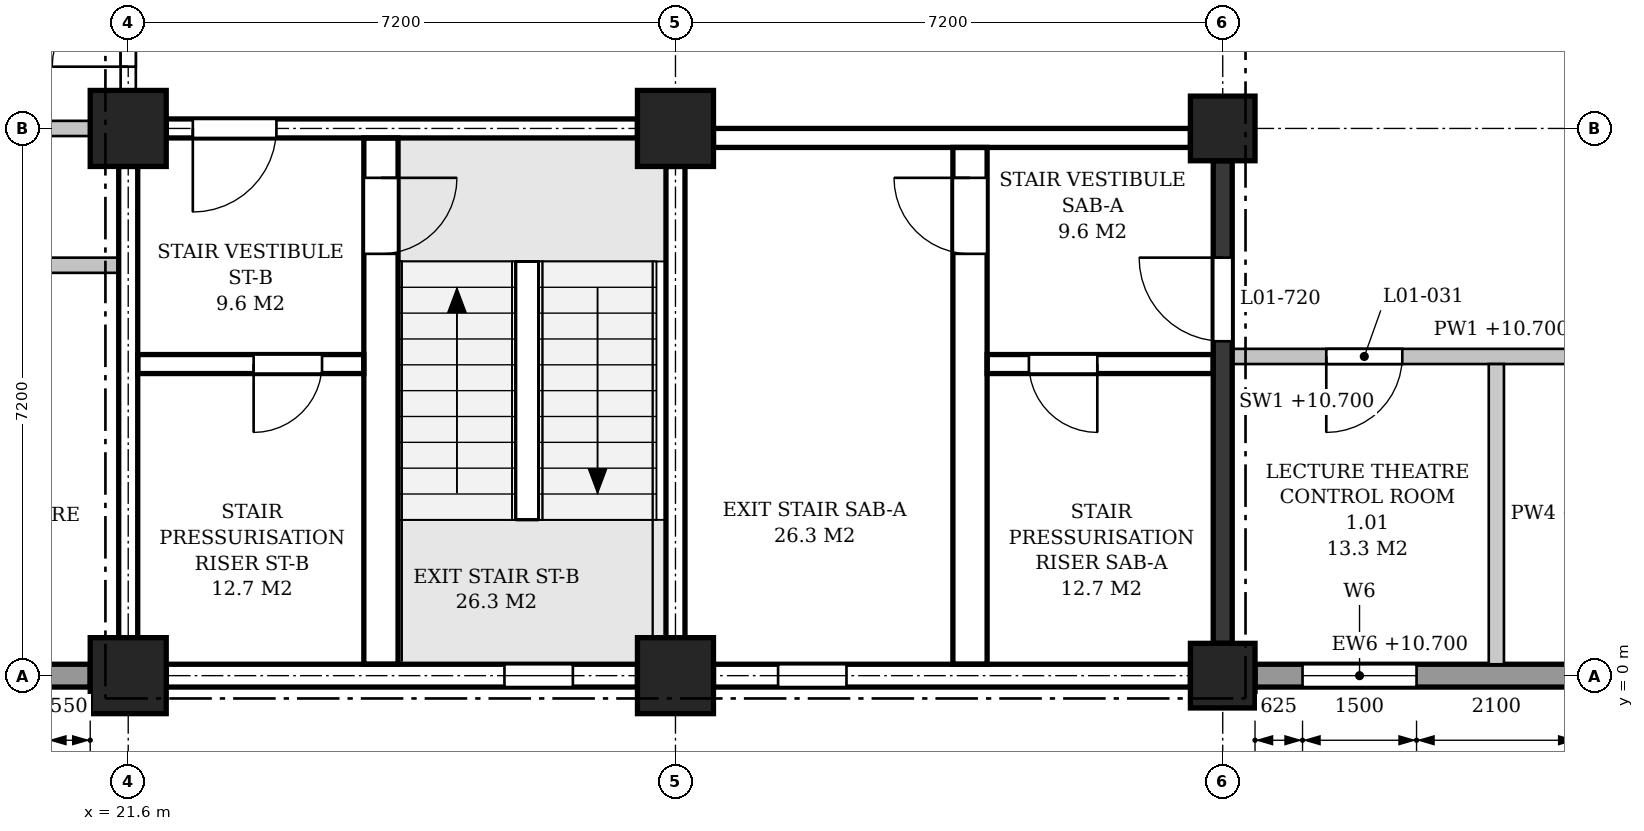
"""IFC4 building model, lengths in metres.
Left out: names, types, materials, properties, quantities, classifications, styles, units other than length and angle.
Written with IfcOpenShell. Run it as: python <this file> out.ifc"""

import sys

from ifc_helpers import new_model, si_unit, direction, frame, frame_2d, origin, origin_2d, place, context, subcontext, project, spatial, polyline, rectangle, outline, extrude, element, fill, save


model = new_model("IFC4")
c1 = context("Model", 3, precision=1e-05, world=origin(), true_north=direction((0.0, 1.0)))
c2 = subcontext(c1, "Body", "Model", "MODEL_VIEW")
j1 = project(units=[si_unit("LENGTHUNIT", "METRE"), si_unit("PLANEANGLEUNIT", "RADIAN")], contexts=[c1])
p1 = place(None, origin())
s1 = spatial("IfcSite", under=j1, at=p1, CompositionType="ELEMENT")
p2 = place(p1, origin())
s2 = spatial("IfcBuilding", under=s1, at=p2, CompositionType="ELEMENT")
p3 = place(p2, frame((0.0, 0.0, 6.0)))
s3 = spatial("IfcBuildingStorey", under=s2, at=p3, CompositionType="ELEMENT", Elevation=6.0)
for number, where, z_axis, x_axis in (
    (1, (21.6, 0.0, 0.0), (0.0, 0.0, 1.0), (1.0, 0.0, 0.0)),
    (2, (21.6, 7.2, 0.0), (0.0, 0.0, 1.0), (1.0, 0.0, 0.0)),
    (3, (28.8, 0.0, 0.0), (0.0, 0.0, 1.0), (1.0, 0.0, 0.0)),
    (4, (28.8, 7.2, 0.0), (0.0, 0.0, 1.0), (1.0, 0.0, 0.0)),
):
    element("IfcColumn", number, at=place(p3, frame(where, z_axis=z_axis, x_axis=x_axis)), inside=s3, PredefinedType="COLUMN", context=c2, shape_type="SweptSolid", body=[
        extrude(rectangle(XDim=1.0, YDim=1.0, at=origin_2d()), origin(), (0.0, 0.0, 1.0), 5.4),
    ])
for number, where, z_axis, x_axis in (
    (5, (36.0, 0.0, 0.0), (0.0, 0.0, 1.0), (1.0, 0.0, 0.0)),
    (6, (36.0, 7.2, 0.0), (0.0, 0.0, 1.0), (1.0, 0.0, 0.0)),
):
    element("IfcColumn", number, at=place(p3, frame(where, z_axis=z_axis, x_axis=x_axis)), inside=s3, PredefinedType="COLUMN", context=c2, shape_type="SweptSolid", body=[
        extrude(rectangle(XDim=0.85, YDim=0.85, at=origin_2d()), origin(), (0.0, 0.0, 1.0), 5.4),
    ])
p4 = place(p3, frame((14.9, 0.0, 0.0), z_axis=(0.0, 0.0, 1.0), x_axis=(1.0, 0.0, 0.0)))
e7 = element("IfcWall", 7, at=p4, inside=s3, PredefinedType="STANDARD", context=c2, shape_type="SweptSolid", body=[
    extrude(rectangle(XDim=6.2, YDim=0.3, at=frame_2d((3.1, 0.0))), origin(), (0.0, 0.0, 1.0), 4.55),
])
p5 = place(p4, frame((0.55, 0.0, 0.9)))
e8 = element("IfcOpeningElement", 8, at=p5, cuts=e7, PredefinedType="OPENING", context=c2, shape_type="SweptSolid", body=[
    extrude(outline(polyline([(0.0, 0.0), (1.5, 0.0), (1.5, 2.85), (0.75, 3.6), (0.0, 2.85), (0.0, 0.0)])), frame((0.0, 0.16, 0.0), z_axis=(0.0, -1.0, 0.0), x_axis=(1.0, 0.0, 0.0)), (0.0, 0.0, 1.0), 0.32),
])
p6 = place(p4, frame((4.15, 0.0, 0.9)))
e9 = element("IfcOpeningElement", 9, at=p6, cuts=e7, PredefinedType="OPENING", context=c2, shape_type="SweptSolid", body=[
    extrude(outline(polyline([(0.0, 0.0), (1.5, 0.0), (1.5, 2.85), (0.75, 3.6), (0.0, 2.85), (0.0, 0.0)])), frame((0.0, 0.16, 0.0), z_axis=(0.0, -1.0, 0.0), x_axis=(1.0, 0.0, 0.0)), (0.0, 0.0, 1.0), 0.32),
])
p7 = place(p3, frame((22.1, 0.0, 0.0), z_axis=(0.0, 0.0, 1.0), x_axis=(1.0, 0.0, 0.0)))
e10 = element("IfcWall", 10, at=p7, inside=s3, PredefinedType="STANDARD", context=c2, shape_type="SweptSolid", body=[
    extrude(rectangle(XDim=6.2, YDim=0.3, at=frame_2d((3.1, 0.0))), origin(), (0.0, 0.0, 1.0), 4.55),
])
p8 = place(p7, frame((4.45, 0.0, 0.9)))
e11 = element("IfcOpeningElement", 11, at=p8, cuts=e10, PredefinedType="OPENING", context=c2, shape_type="SweptSolid", body=[
    extrude(outline(polyline([(0.0, 0.0), (0.9, 0.0), (0.9, 3.15), (0.45, 3.6), (0.0, 3.15), (0.0, 0.0)])), frame((0.0, 0.16, 0.0), z_axis=(0.0, -1.0, 0.0), x_axis=(1.0, 0.0, 0.0)), (0.0, 0.0, 1.0), 0.32),
])
p9 = place(p3, frame((29.3, 0.0, 0.0), z_axis=(0.0, 0.0, 1.0), x_axis=(1.0, 0.0, 0.0)))
e12 = element("IfcWall", 12, at=p9, inside=s3, PredefinedType="STANDARD", context=c2, shape_type="SweptSolid", body=[
    extrude(rectangle(XDim=6.275, YDim=0.3, at=frame_2d((3.137, 0.0))), origin(), (0.0, 0.0, 1.0), 4.7),
])
p10 = place(p9, frame((0.85, 0.0, 0.9)))
e13 = element("IfcOpeningElement", 13, at=p10, cuts=e12, PredefinedType="OPENING", context=c2, shape_type="SweptSolid", body=[
    extrude(outline(polyline([(0.0, 0.0), (0.9, 0.0), (0.9, 3.15), (0.45, 3.6), (0.0, 3.15), (0.0, 0.0)])), frame((0.0, 0.16, 0.0), z_axis=(0.0, -1.0, 0.0), x_axis=(1.0, 0.0, 0.0)), (0.0, 0.0, 1.0), 0.32),
])
p11 = place(p3, frame((36.425, 0.0, 0.0), z_axis=(0.0, 0.0, 1.0), x_axis=(1.0, 0.0, 0.0)))
e14 = element("IfcWall", 14, at=p11, inside=s3, PredefinedType="STANDARD", context=c2, shape_type="SweptSolid", body=[
    extrude(rectangle(XDim=6.35, YDim=0.3, at=frame_2d((3.175, 0.0))), origin(), (0.0, 0.0, 1.0), 4.7),
])
p12 = place(p11, frame((0.625, 0.0, 0.9)))
e15 = element("IfcOpeningElement", 15, at=p12, cuts=e14, PredefinedType="OPENING", context=c2, shape_type="SweptSolid", body=[
    extrude(outline(polyline([(0.0, 0.0), (1.5, 0.0), (1.5, 2.85), (0.75, 3.6), (0.0, 2.85), (0.0, 0.0)])), frame((0.0, 0.16, 0.0), z_axis=(0.0, -1.0, 0.0), x_axis=(1.0, 0.0, 0.0)), (0.0, 0.0, 1.0), 0.32),
])
p13 = place(p11, frame((4.225, 0.0, 0.9)))
e16 = element("IfcOpeningElement", 16, at=p13, cuts=e14, PredefinedType="OPENING", context=c2, shape_type="SweptSolid", body=[
    extrude(outline(polyline([(0.0, 0.0), (1.5, 0.0), (1.5, 2.85), (0.75, 3.6), (0.0, 2.85), (0.0, 0.0)])), frame((0.0, 0.16, 0.0), z_axis=(0.0, -1.0, 0.0), x_axis=(1.0, 0.0, 0.0)), (0.0, 0.0, 1.0), 0.32),
])
p14 = place(p3, frame((29.3, 7.075, 0.0), z_axis=(0.0, 0.0, 1.0), x_axis=(1.0, 0.0, 0.0)))
e17 = element("IfcWall", 17, at=p14, inside=s3, PredefinedType="SHEAR", context=c2, shape_type="SweptSolid", body=[
    extrude(rectangle(XDim=6.275, YDim=0.25, at=frame_2d((3.137, 0.0))), origin(), (0.0, 0.0, 1.0), 4.7),
])
p15 = place(p3, frame((28.8, 0.5, -0.25), z_axis=(0.0, 0.0, 1.0), x_axis=(0.0, 1.0, 0.0)))
e18 = element("IfcWall", 18, at=p15, inside=s3, PredefinedType="SHEAR", context=c2, shape_type="SweptSolid", body=[
    extrude(rectangle(XDim=6.2, YDim=0.25, at=frame_2d((3.1, 0.0))), origin(), (0.0, 0.0, 1.0), 4.8),
])
p16 = place(p3, frame((36.0, 0.425, 0.0), z_axis=(0.0, 0.0, 1.0), x_axis=(0.0, 1.0, 0.0)))
e19 = element("IfcWall", 19, at=p16, inside=s3, PredefinedType="SHEAR", context=c2, shape_type="SweptSolid", body=[
    extrude(rectangle(XDim=6.35, YDim=0.25, at=frame_2d((3.175, 0.0))), origin(), (0.0, 0.0, 1.0), 4.7),
])
p17 = place(p16, frame((3.975, 0.0, 0.0)))
e20 = element("IfcOpeningElement", 20, at=p17, cuts=e19, PredefinedType="OPENING", context=c2, shape_type="SweptSolid", body=[
    extrude(rectangle(XDim=1.1, YDim=2.1, at=frame_2d((0.55, 1.05))), frame((0.0, 0.135, 0.0), z_axis=(0.0, -1.0, 0.0), x_axis=(1.0, 0.0, 0.0)), (0.0, 0.0, 1.0), 0.27),
])
p18 = place(p3, frame((32.675, 0.15, 0.0), z_axis=(0.0, 0.0, 1.0), x_axis=(0.0, 1.0, 0.0)))
e21 = element("IfcWall", 21, at=p18, inside=s3, PredefinedType="SHEAR", context=c2, shape_type="SweptSolid", body=[
    extrude(rectangle(XDim=6.8, YDim=0.45, at=frame_2d((3.4, 0.0))), origin(), (0.0, 0.0, 1.0), 4.7),
])
p19 = place(p18, frame((5.4, 0.0, 0.0)))
e22 = element("IfcOpeningElement", 22, at=p19, cuts=e21, PredefinedType="OPENING", context=c2, shape_type="SweptSolid", body=[
    extrude(rectangle(XDim=1.0, YDim=2.1, at=frame_2d((0.5, 1.05))), frame((0.0, 0.235, 0.0), z_axis=(0.0, -1.0, 0.0), x_axis=(1.0, 0.0, 0.0)), (0.0, 0.0, 1.0), 0.47),
])
p20 = place(p3, frame((32.9, 4.1, 0.0), z_axis=(0.0, 0.0, 1.0), x_axis=(1.0, 0.0, 0.0)))
e23 = element("IfcWall", 23, at=p20, inside=s3, PredefinedType="SHEAR", context=c2, shape_type="SweptSolid", body=[
    extrude(rectangle(XDim=2.975, YDim=0.25, at=frame_2d((1.488, 0.0))), origin(), (0.0, 0.0, 1.0), 4.7),
])
p21 = place(p20, frame((0.55, 0.0, 0.0)))
e24 = element("IfcOpeningElement", 24, at=p21, cuts=e23, PredefinedType="OPENING", context=c2, shape_type="SweptSolid", body=[
    extrude(rectangle(XDim=0.9, YDim=2.1, at=frame_2d((0.45, 1.05))), frame((0.0, 0.135, 0.0), z_axis=(0.0, -1.0, 0.0), x_axis=(1.0, 0.0, 0.0)), (0.0, 0.0, 1.0), 0.27),
])
p22 = place(p3, frame((22.1, 7.2, 0.0), z_axis=(0.0, 0.0, 1.0), x_axis=(1.0, 0.0, 0.0)))
e25 = element("IfcWall", 25, at=p22, inside=s3, PredefinedType="SHEAR", context=c2, shape_type="SweptSolid", body=[
    extrude(rectangle(XDim=6.2, YDim=0.25, at=frame_2d((3.1, 0.0))), origin(), (0.0, 0.0, 1.0), 4.4),
])
p23 = place(p22, frame((0.35, 0.0, 0.0)))
e26 = element("IfcOpeningElement", 26, at=p23, cuts=e25, PredefinedType="OPENING", context=c2, shape_type="SweptSolid", body=[
    extrude(rectangle(XDim=1.1, YDim=2.1, at=frame_2d((0.55, 1.05))), frame((0.0, 0.135, 0.0), z_axis=(0.0, -1.0, 0.0), x_axis=(1.0, 0.0, 0.0)), (0.0, 0.0, 1.0), 0.27),
])
p24 = place(p3, frame((21.6, 0.5, 0.0), z_axis=(0.0, 0.0, 1.0), x_axis=(0.0, 1.0, 0.0)))
e27 = element("IfcWall", 27, at=p24, inside=s3, PredefinedType="SHEAR", context=c2, shape_type="SweptSolid", body=[
    extrude(rectangle(XDim=6.2, YDim=0.25, at=frame_2d((3.1, 0.0))), origin(), (0.0, 0.0, 1.0), 4.4),
])
p25 = place(p3, frame((24.925, 0.15, 0.0), z_axis=(0.0, 0.0, 1.0), x_axis=(0.0, 1.0, 0.0)))
e28 = element("IfcWall", 28, at=p25, inside=s3, PredefinedType="SHEAR", context=c2, shape_type="SweptSolid", body=[
    extrude(rectangle(XDim=6.925, YDim=0.45, at=frame_2d((3.462, 0.0))), origin(), (0.0, 0.0, 1.0), 5.15),
])
p26 = place(p25, frame((5.4, 0.0, 0.0)))
e29 = element("IfcOpeningElement", 29, at=p26, cuts=e28, PredefinedType="OPENING", context=c2, shape_type="SweptSolid", body=[
    extrude(rectangle(XDim=1.0, YDim=2.1, at=frame_2d((0.5, 1.05))), frame((0.0, 0.235, 0.0), z_axis=(0.0, -1.0, 0.0), x_axis=(1.0, 0.0, 0.0)), (0.0, 0.0, 1.0), 0.47),
])
p27 = place(p3, frame((21.725, 4.1, 0.0), z_axis=(0.0, 0.0, 1.0), x_axis=(1.0, 0.0, 0.0)))
e30 = element("IfcWall", 30, at=p27, inside=s3, PredefinedType="SHEAR", context=c2, shape_type="SweptSolid", body=[
    extrude(rectangle(XDim=2.975, YDim=0.25, at=frame_2d((1.487, 0.0))), origin(), (0.0, 0.0, 1.0), 5.15),
])
p28 = place(p27, frame((1.525, 0.0, 0.0)))
e31 = element("IfcOpeningElement", 31, at=p28, cuts=e30, PredefinedType="OPENING", context=c2, shape_type="SweptSolid", body=[
    extrude(rectangle(XDim=0.9, YDim=2.1, at=frame_2d((0.45, 1.05))), frame((0.0, 0.135, 0.0), z_axis=(0.0, -1.0, 0.0), x_axis=(1.0, 0.0, 0.0)), (0.0, 0.0, 1.0), 0.27),
])
p29 = place(p2, origin())
s4 = spatial("IfcBuildingStorey", under=s2, at=p29, CompositionType="ELEMENT", Elevation=0.0)
p30 = place(p29, frame((29.3, 7.4, 0.0), z_axis=(0.0, 0.0, 1.0), x_axis=(1.0, 0.0, 0.0)))
e32 = element("IfcWall", 32, at=p30, inside=s4, PredefinedType="SOLIDWALL", context=c2, shape_type="SweptSolid", body=[
    extrude(rectangle(XDim=6.275, YDim=0.4, at=frame_2d((3.137, 0.0))), origin(), (0.0, 0.0, 1.0), 10.7),
])
p31 = place(p29, frame((36.425, 7.4, 0.0), z_axis=(0.0, 0.0, 1.0), x_axis=(1.0, 0.0, 0.0)))
e33 = element("IfcWall", 33, at=p31, inside=s4, PredefinedType="SOLIDWALL", context=c2, shape_type="SweptSolid", body=[
    extrude(rectangle(XDim=6.35, YDim=0.4, at=frame_2d((3.175, 0.0))), origin(), (0.0, 0.0, 1.0), 10.7),
])
p32 = place(p29, frame((29.0, 7.7, 0.0), z_axis=(0.0, 0.0, 1.0), x_axis=(0.0, 1.0, 0.0)))
e34 = element("IfcWall", 34, at=p32, inside=s4, PredefinedType="SOLIDWALL", context=c2, shape_type="SweptSolid", body=[
    extrude(rectangle(XDim=6.2, YDim=0.4, at=frame_2d((3.1, 0.0))), origin(), (0.0, 0.0, 1.0), 10.55),
])
p33 = place(p3, frame((36.125, 4.2, 0.0), z_axis=(0.0, 0.0, 1.0), x_axis=(1.0, 0.0, 0.0)))
e35 = element("IfcWall", 35, at=p33, inside=s3, PredefinedType="PARTITIONING", context=c2, shape_type="SweptSolid", body=[
    extrude(rectangle(XDim=7.075, YDim=0.2, at=frame_2d((3.538, 0.0))), origin(), (0.0, 0.0, 1.0), 4.7),
])
p34 = place(p33, frame((1.238, 0.0, 0.0)))
e36 = element("IfcOpeningElement", 36, at=p34, cuts=e35, PredefinedType="OPENING", context=c2, shape_type="SweptSolid", body=[
    extrude(rectangle(XDim=1.0, YDim=2.1, at=frame_2d((0.5, 1.05))), frame((0.0, 0.11, 0.0), z_axis=(0.0, -1.0, 0.0), x_axis=(1.0, 0.0, 0.0)), (0.0, 0.0, 1.0), 0.22),
])
p35 = place(p3, frame((7.325, 5.4, 0.0), z_axis=(0.0, 0.0, 1.0), x_axis=(1.0, 0.0, 0.0)))
e37 = element("IfcWall", 37, at=p35, inside=s3, PredefinedType="PARTITIONING", context=c2, shape_type="SweptSolid", body=[
    extrude(outline(polyline([(0.0, 0.0), (14.15, 0.0), (14.15, 4.4), (14.025, 4.4), (14.025, 5.15), (7.325, 5.15), (7.325, 4.4), (6.825, 4.4), (6.825, 5.15), (0.125, 5.15), (0.125, 4.4), (0.0, 4.4), (0.0, 0.0)])), frame((0.0, 0.1, 0.0), z_axis=(0.0, -1.0, 0.0), x_axis=(1.0, 0.0, 0.0)), (0.0, 0.0, 1.0), 0.2),
])
p36 = place(p35, frame((1.238, 0.0, 0.0)))
e38 = element("IfcOpeningElement", 38, at=p36, cuts=e37, PredefinedType="OPENING", context=c2, shape_type="SweptSolid", body=[
    extrude(rectangle(XDim=1.0, YDim=2.1, at=frame_2d((0.5, 1.05))), frame((0.0, 0.11, 0.0), z_axis=(0.0, -1.0, 0.0), x_axis=(1.0, 0.0, 0.0)), (0.0, 0.0, 1.0), 0.22),
])
p37 = place(p35, frame((4.775, 0.0, 0.0)))
e39 = element("IfcOpeningElement", 39, at=p37, cuts=e37, PredefinedType="OPENING", context=c2, shape_type="SweptSolid", body=[
    extrude(rectangle(XDim=1.0, YDim=2.1, at=frame_2d((0.5, 1.05))), frame((0.0, 0.11, 0.0), z_axis=(0.0, -1.0, 0.0), x_axis=(1.0, 0.0, 0.0)), (0.0, 0.0, 1.0), 0.22),
])
p38 = place(p35, frame((8.375, 0.0, 0.0)))
e40 = element("IfcOpeningElement", 40, at=p38, cuts=e37, PredefinedType="OPENING", context=c2, shape_type="SweptSolid", body=[
    extrude(rectangle(XDim=1.0, YDim=2.1, at=frame_2d((0.5, 1.05))), frame((0.0, 0.11, 0.0), z_axis=(0.0, -1.0, 0.0), x_axis=(1.0, 0.0, 0.0)), (0.0, 0.0, 1.0), 0.22),
])
p39 = place(p35, frame((11.913, 0.0, 0.0)))
e41 = element("IfcOpeningElement", 41, at=p39, cuts=e37, PredefinedType="OPENING", context=c2, shape_type="SweptSolid", body=[
    extrude(rectangle(XDim=1.0, YDim=2.1, at=frame_2d((0.5, 1.05))), frame((0.0, 0.11, 0.0), z_axis=(0.0, -1.0, 0.0), x_axis=(1.0, 0.0, 0.0)), (0.0, 0.0, 1.0), 0.22),
])
p40 = place(p3, frame((14.9, 7.2, 0.0), z_axis=(0.0, 0.0, 1.0), x_axis=(1.0, 0.0, 0.0)))
e42 = element("IfcWall", 42, at=p40, inside=s3, PredefinedType="PARTITIONING", context=c2, shape_type="SweptSolid", body=[
    extrude(rectangle(XDim=6.2, YDim=0.2, at=frame_2d((3.1, 0.0))), origin(), (0.0, 0.0, 1.0), 4.4),
])
p41 = place(p40, frame((4.15, 0.0, 0.0)))
e43 = element("IfcOpeningElement", 43, at=p41, cuts=e42, PredefinedType="OPENING", context=c2, shape_type="SweptSolid", body=[
    extrude(rectangle(XDim=1.0, YDim=2.1, at=frame_2d((0.5, 1.05))), frame((0.0, 0.11, 0.0), z_axis=(0.0, -1.0, 0.0), x_axis=(1.0, 0.0, 0.0)), (0.0, 0.0, 1.0), 0.22),
])
p42 = place(p3, frame((21.6, 7.7, 0.0), z_axis=(0.0, 0.0, 1.0), x_axis=(0.0, 1.0, 0.0)))
e44 = element("IfcWall", 44, at=p42, inside=s3, PredefinedType="PARTITIONING", context=c2, shape_type="SweptSolid", body=[
    extrude(rectangle(XDim=2.625, YDim=0.2, at=frame_2d((1.312, 0.0))), origin(), (0.0, 0.0, 1.0), 4.4),
])
p43 = place(p42, frame((0.312, 0.0, 0.0)))
e45 = element("IfcOpeningElement", 45, at=p43, cuts=e44, PredefinedType="OPENING", context=c2, shape_type="SweptSolid", body=[
    extrude(rectangle(XDim=2.0, YDim=2.4, at=frame_2d((1.0, 1.2))), frame((0.0, 0.11, 0.0), z_axis=(0.0, -1.0, 0.0), x_axis=(1.0, 0.0, 0.0)), (0.0, 0.0, 1.0), 0.22),
])
p44 = place(p3, frame((39.6, 0.15, 0.0), z_axis=(0.0, 0.0, 1.0), x_axis=(0.0, 1.0, 0.0)))
e46 = element("IfcWall", 46, at=p44, inside=s3, PredefinedType="PARTITIONING", context=c2, shape_type="SweptSolid", body=[
    extrude(rectangle(XDim=3.95, YDim=0.2, at=frame_2d((1.975, 0.0))), origin(), (0.0, 0.0, 1.0), 4.7),
])
p45 = place(p10, origin())
e47 = element("IfcWindow", 47, at=p45, inside=s3, PartitioningType="SINGLE_PANEL", PredefinedType="WINDOW", context=c2, shape_type="SweptSolid", body=[
    extrude(outline(polyline([(0.0, 0.0), (0.9, 0.0), (0.9, 3.15), (0.45, 3.6), (0.0, 3.15), (0.0, 0.0)])), frame((0.0, 0.03, 0.0), z_axis=(0.0, -1.0, 0.0), x_axis=(1.0, 0.0, 0.0)), (0.0, 0.0, 1.0), 0.06),
])
fill(e13, e47)
p46 = place(p12, origin())
e48 = element("IfcWindow", 48, at=p46, inside=s3, PartitioningType="SINGLE_PANEL", PredefinedType="WINDOW", context=c2, shape_type="SweptSolid", body=[
    extrude(outline(polyline([(0.0, 0.0), (1.5, 0.0), (1.5, 2.85), (0.75, 3.6), (0.0, 2.85), (0.0, 0.0)])), frame((0.0, 0.03, 0.0), z_axis=(0.0, -1.0, 0.0), x_axis=(1.0, 0.0, 0.0)), (0.0, 0.0, 1.0), 0.06),
])
fill(e15, e48)
p47 = place(p8, origin())
e49 = element("IfcWindow", 49, at=p47, inside=s3, PartitioningType="SINGLE_PANEL", PredefinedType="WINDOW", context=c2, shape_type="SweptSolid", body=[
    extrude(outline(polyline([(0.0, 0.0), (0.9, 0.0), (0.9, 3.15), (0.45, 3.6), (0.0, 3.15), (0.0, 0.0)])), frame((0.0, 0.03, 0.0), z_axis=(0.0, -1.0, 0.0), x_axis=(1.0, 0.0, 0.0)), (0.0, 0.0, 1.0), 0.06),
])
fill(e11, e49)
p48 = place(p19, origin())
e50 = element("IfcDoor", 50, at=p48, inside=s3, OperationType="SINGLE_SWING_RIGHT", PredefinedType="DOOR", context=c2, shape_type="SweptSolid", body=[
    extrude(rectangle(XDim=1.0, YDim=2.1, at=frame_2d((0.5, 1.05))), frame((0.0, 0.025, 0.0), z_axis=(0.0, -1.0, 0.0), x_axis=(1.0, 0.0, 0.0)), (0.0, 0.0, 1.0), 0.05),
])
fill(e22, e50)
p49 = place(p17, origin())
e51 = element("IfcDoor", 51, at=p49, inside=s3, OperationType="SINGLE_SWING_RIGHT", PredefinedType="DOOR", context=c2, shape_type="SweptSolid", body=[
    extrude(rectangle(XDim=1.1, YDim=2.1, at=frame_2d((0.55, 1.05))), frame((0.0, 0.025, 0.0), z_axis=(0.0, -1.0, 0.0), x_axis=(1.0, 0.0, 0.0)), (0.0, 0.0, 1.0), 0.05),
])
fill(e20, e51)
p50 = place(p21, frame((0.9, 0.0, 0.0), z_axis=(0.0, 0.0, 1.0), x_axis=(-1.0, 0.0, 0.0)))
e52 = element("IfcDoor", 52, at=p50, inside=s3, OperationType="SINGLE_SWING_LEFT", PredefinedType="DOOR", context=c2, shape_type="SweptSolid", body=[
    extrude(rectangle(XDim=0.9, YDim=2.1, at=frame_2d((0.45, 1.05))), frame((0.0, 0.025, 0.0), z_axis=(0.0, -1.0, 0.0), x_axis=(1.0, 0.0, 0.0)), (0.0, 0.0, 1.0), 0.05),
])
fill(e24, e52)
p51 = place(p26, frame((1.0, 0.0, 0.0), z_axis=(0.0, 0.0, 1.0), x_axis=(-1.0, 0.0, 0.0)))
e53 = element("IfcDoor", 53, at=p51, inside=s3, OperationType="SINGLE_SWING_LEFT", PredefinedType="DOOR", context=c2, shape_type="SweptSolid", body=[
    extrude(rectangle(XDim=1.0, YDim=2.1, at=frame_2d((0.5, 1.05))), frame((0.0, 0.025, 0.0), z_axis=(0.0, -1.0, 0.0), x_axis=(1.0, 0.0, 0.0)), (0.0, 0.0, 1.0), 0.05),
])
fill(e29, e53)
p52 = place(p23, frame((1.1, 0.0, 0.0), z_axis=(0.0, 0.0, 1.0), x_axis=(-1.0, 0.0, 0.0)))
e54 = element("IfcDoor", 54, at=p52, inside=s3, OperationType="SINGLE_SWING_RIGHT", PredefinedType="DOOR", context=c2, shape_type="SweptSolid", body=[
    extrude(rectangle(XDim=1.1, YDim=2.1, at=frame_2d((0.55, 1.05))), frame((0.0, 0.025, 0.0), z_axis=(0.0, -1.0, 0.0), x_axis=(1.0, 0.0, 0.0)), (0.0, 0.0, 1.0), 0.05),
])
fill(e26, e54)
p53 = place(p28, frame((0.9, 0.0, 0.0), z_axis=(0.0, 0.0, 1.0), x_axis=(-1.0, 0.0, 0.0)))
e55 = element("IfcDoor", 55, at=p53, inside=s3, OperationType="SINGLE_SWING_RIGHT", PredefinedType="DOOR", context=c2, shape_type="SweptSolid", body=[
    extrude(rectangle(XDim=0.9, YDim=2.1, at=frame_2d((0.45, 1.05))), frame((0.0, 0.025, 0.0), z_axis=(0.0, -1.0, 0.0), x_axis=(1.0, 0.0, 0.0)), (0.0, 0.0, 1.0), 0.05),
])
fill(e31, e55)
p54 = place(p43, origin())
e56 = element("IfcDoor", 56, at=p54, inside=s3, OperationType="DOUBLE_DOOR_SINGLE_SWING", PredefinedType="DOOR", context=c2, shape_type="SweptSolid", body=[
    extrude(rectangle(XDim=2.0, YDim=2.4, at=frame_2d((1.0, 1.2))), frame((0.0, 0.025, 0.0), z_axis=(0.0, -1.0, 0.0), x_axis=(1.0, 0.0, 0.0)), (0.0, 0.0, 1.0), 0.05),
])
fill(e45, e56)
p55 = place(p34, frame((1.0, 0.0, 0.0), z_axis=(0.0, 0.0, 1.0), x_axis=(-1.0, 0.0, 0.0)))
e57 = element("IfcDoor", 57, at=p55, inside=s3, OperationType="SINGLE_SWING_RIGHT", PredefinedType="DOOR", context=c2, shape_type="SweptSolid", body=[
    extrude(rectangle(XDim=1.0, YDim=2.1, at=frame_2d((0.5, 1.05))), frame((0.0, 0.025, 0.0), z_axis=(0.0, -1.0, 0.0), x_axis=(1.0, 0.0, 0.0)), (0.0, 0.0, 1.0), 0.05),
])
fill(e36, e57)
save(model, sys.argv[1])
